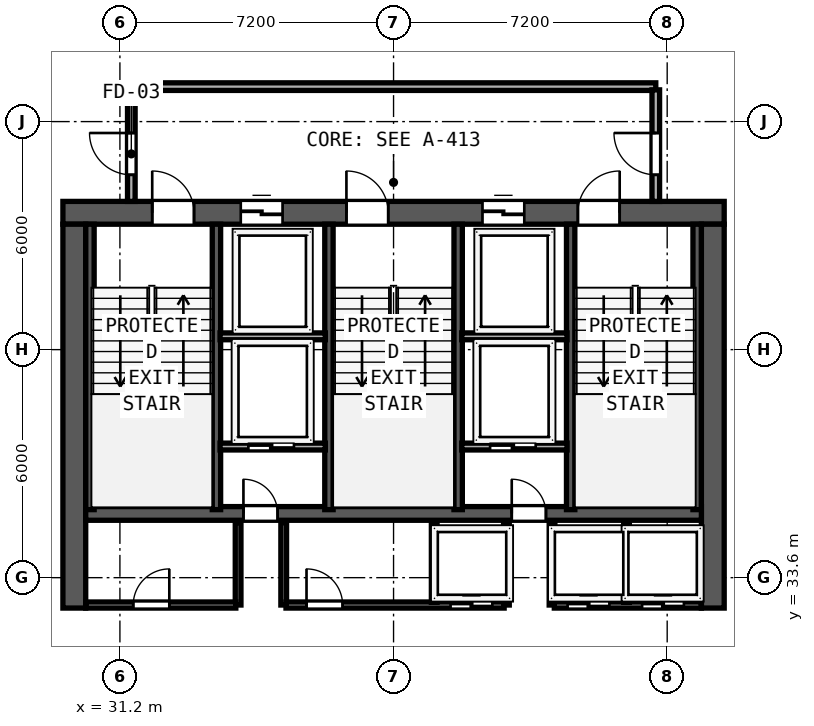
"""IFC4 building model, lengths in metres.
Left out: names, types, materials, properties, quantities, classifications, styles, units other than length and angle.
Written with IfcOpenShell. Run it as: python <this file> out.ifc"""

import sys

from ifc_helpers import new_model, si_unit, direction, frame, frame_2d, origin, place, context, subcontext, project, spatial, rectangle, extrude, element, fill, save


model = new_model("IFC4")
c1 = context("Model", 3, precision=1e-05, world=origin(), true_north=direction((0.0, 1.0)))
c2 = subcontext(c1, "Body", "Model", "MODEL_VIEW")
j1 = project(units=[si_unit("LENGTHUNIT", "METRE"), si_unit("PLANEANGLEUNIT", "RADIAN")], contexts=[c1])
p1 = place(None, origin())
s1 = spatial("IfcSite", under=j1, at=p1, CompositionType="ELEMENT")
p2 = place(p1, origin())
s2 = spatial("IfcBuilding", under=s1, at=p2, CompositionType="ELEMENT")
p3 = place(p2, frame((0.0, 0.0, 176.6)))
s3 = spatial("IfcBuildingStorey", under=s2, at=p3, CompositionType="ELEMENT", Elevation=176.6)
p4 = place(p3, frame((29.7, 43.2, 0.0), z_axis=(0.0, 0.0, 1.0), x_axis=(1.0, 0.0, 0.0)))
e1 = element("IfcWall", 1, at=p4, inside=s3, PredefinedType="SHEAR", context=c2, shape_type="SweptSolid", body=[
    extrude(rectangle(XDim=17.4, YDim=0.6, at=frame_2d((8.7, 0.0))), origin(), (0.0, 0.0, 1.0), 3.62),
])
p5 = place(p4, frame((2.35, 0.0, 0.0)))
e2 = element("IfcOpeningElement", 2, at=p5, cuts=e1, PredefinedType="OPENING", context=c2, shape_type="SweptSolid", body=[
    extrude(rectangle(XDim=1.1, YDim=2.15, at=frame_2d((0.55, 1.075))), frame((0.0, 0.31, 0.0), z_axis=(0.0, -1.0, 0.0), x_axis=(1.0, 0.0, 0.0)), (0.0, 0.0, 1.0), 0.62),
])
p6 = place(p4, frame((7.46, 0.0, 0.0)))
e3 = element("IfcOpeningElement", 3, at=p6, cuts=e1, PredefinedType="OPENING", context=c2, shape_type="SweptSolid", body=[
    extrude(rectangle(XDim=1.1, YDim=2.15, at=frame_2d((0.55, 1.075))), frame((0.0, 0.31, 0.0), z_axis=(0.0, -1.0, 0.0), x_axis=(1.0, 0.0, 0.0)), (0.0, 0.0, 1.0), 0.62),
])
p7 = place(p4, frame((13.55, 0.0, 0.0)))
e4 = element("IfcOpeningElement", 4, at=p7, cuts=e1, PredefinedType="OPENING", context=c2, shape_type="SweptSolid", body=[
    extrude(rectangle(XDim=1.1, YDim=2.15, at=frame_2d((0.55, 1.075))), frame((0.0, 0.31, 0.0), z_axis=(0.0, -1.0, 0.0), x_axis=(1.0, 0.0, 0.0)), (0.0, 0.0, 1.0), 0.62),
])
p8 = place(p4, frame((4.68, 0.0, 0.0)))
e5 = element("IfcOpeningElement", 5, at=p8, cuts=e1, PredefinedType="OPENING", context=c2, shape_type="SweptSolid", body=[
    extrude(rectangle(XDim=1.1, YDim=2.2, at=frame_2d((0.55, 1.1))), frame((0.0, 0.31, 0.0), z_axis=(0.0, -1.0, 0.0), x_axis=(1.0, 0.0, 0.0)), (0.0, 0.0, 1.0), 0.62),
])
p9 = place(p4, frame((11.04, 0.0, 0.0)))
e6 = element("IfcOpeningElement", 6, at=p9, cuts=e1, PredefinedType="OPENING", context=c2, shape_type="SweptSolid", body=[
    extrude(rectangle(XDim=1.1, YDim=2.2, at=frame_2d((0.55, 1.1))), frame((0.0, 0.31, 0.0), z_axis=(0.0, -1.0, 0.0), x_axis=(1.0, 0.0, 0.0)), (0.0, 0.0, 1.0), 0.62),
])
for number, where, z_axis, x_axis in (
    (7, (30.0, 32.8, 0.0), (0.0, 0.0, 1.0), (0.0, 1.0, 0.0)),
    (8, (46.8, 32.8, 0.0), (0.0, 0.0, 1.0), (0.0, 1.0, 0.0)),
):
    element("IfcWall", number, at=place(p3, frame(where, z_axis=z_axis, x_axis=x_axis)), inside=s3, PredefinedType="SHEAR", context=c2, shape_type="SweptSolid", body=[
        extrude(rectangle(XDim=10.1, YDim=0.6, at=frame_2d((5.05, 0.0))), origin(), (0.0, 0.0, 1.0), 3.62),
    ])
p10 = place(p3, frame((30.3, 35.29, 0.0), z_axis=(0.0, 0.0, 1.0), x_axis=(1.0, 0.0, 0.0)))
e9 = element("IfcWall", 9, at=p10, inside=s3, PredefinedType="SHEAR", context=c2, shape_type="SweptSolid", body=[
    extrude(rectangle(XDim=16.2, YDim=0.36, at=frame_2d((8.1, 0.0))), origin(), (0.0, 0.0, 1.0), 3.62),
])
p11 = place(p10, frame((5.05, 0.0, 0.0), z_axis=(0.0, 0.0, 1.0), x_axis=(-1.0, 0.0, 0.0)))
e10 = element("IfcOpeningElement", 10, at=p11, cuts=e9, PredefinedType="OPENING", context=c2, shape_type="SweptSolid", body=[
    extrude(rectangle(XDim=0.9, YDim=2.1, at=frame_2d((0.45, 1.05))), frame((0.0, 0.19, 0.0), z_axis=(0.0, -1.0, 0.0), x_axis=(1.0, 0.0, 0.0)), (0.0, 0.0, 1.0), 0.38),
])
p12 = place(p10, frame((12.11, 0.0, 0.0), z_axis=(0.0, 0.0, 1.0), x_axis=(-1.0, 0.0, 0.0)))
e11 = element("IfcOpeningElement", 11, at=p12, cuts=e9, PredefinedType="OPENING", context=c2, shape_type="SweptSolid", body=[
    extrude(rectangle(XDim=0.9, YDim=2.1, at=frame_2d((0.45, 1.05))), frame((0.0, 0.19, 0.0), z_axis=(0.0, -1.0, 0.0), x_axis=(1.0, 0.0, 0.0)), (0.0, 0.0, 1.0), 0.38),
])
for number, where, z_axis, x_axis in (
    (12, (30.412, 35.39, 0.0), (0.0, 0.0, 1.0), (0.0, 1.0, 0.0)),
    (13, (33.74, 35.39, 0.0), (0.0, 0.0, 1.0), (0.0, 1.0, 0.0)),
    (14, (36.7, 35.39, 0.0), (0.0, 0.0, 1.0), (0.0, 1.0, 0.0)),
    (15, (40.1, 35.39, 0.0), (0.0, 0.0, 1.0), (0.0, 1.0, 0.0)),
    (16, (43.06, 35.39, 0.0), (0.0, 0.0, 1.0), (0.0, 1.0, 0.0)),
    (17, (46.388, 35.39, 0.0), (0.0, 0.0, 1.0), (0.0, 1.0, 0.0)),
):
    element("IfcWall", number, at=place(p3, frame(where, z_axis=z_axis, x_axis=x_axis)), inside=s3, PredefinedType="SHEAR", context=c2, shape_type="SweptSolid", body=[
        extrude(rectangle(XDim=7.51, YDim=0.22, at=frame_2d((3.755, 0.0))), origin(), (0.0, 0.0, 1.0), 3.62),
    ])
p13 = place(p3, frame((31.5, 46.52, 0.0), z_axis=(0.0, 0.0, 1.0), x_axis=(1.0, 0.0, 0.0)))
e18 = element("IfcWall", 18, at=p13, inside=s3, PredefinedType="SOLIDWALL", context=c2, shape_type="SweptSolid", body=[
    extrude(rectangle(XDim=13.8, YDim=0.2, at=frame_2d((6.9, 0.0))), origin(), (0.0, 0.0, 1.0), 3.62),
])
p14 = place(p3, frame((31.5, 43.5, 0.0), z_axis=(0.0, 0.0, 1.0), x_axis=(0.0, 1.0, 0.0)))
e19 = element("IfcWall", 19, at=p14, inside=s3, PredefinedType="SOLIDWALL", context=c2, shape_type="SweptSolid", body=[
    extrude(rectangle(XDim=2.935, YDim=0.2, at=frame_2d((1.468, 0.0))), origin(), (0.0, 0.0, 1.0), 3.62),
])
p15 = place(p14, frame((1.8, 0.0, 0.0), z_axis=(0.0, 0.0, 1.0), x_axis=(-1.0, 0.0, 0.0)))
e20 = element("IfcOpeningElement", 20, at=p15, cuts=e19, PredefinedType="OPENING", context=c2, shape_type="SweptSolid", body=[
    extrude(rectangle(XDim=1.1, YDim=2.15, at=frame_2d((0.55, 1.075))), frame((0.0, 0.11, 0.0), z_axis=(0.0, -1.0, 0.0), x_axis=(1.0, 0.0, 0.0)), (0.0, 0.0, 1.0), 0.22),
])
p16 = place(p3, frame((45.3, 43.5, 0.0), z_axis=(0.0, 0.0, 1.0), x_axis=(0.0, 1.0, 0.0)))
e21 = element("IfcWall", 21, at=p16, inside=s3, PredefinedType="SOLIDWALL", context=c2, shape_type="SweptSolid", body=[
    extrude(rectangle(XDim=2.935, YDim=0.2, at=frame_2d((1.468, 0.0))), origin(), (0.0, 0.0, 1.0), 3.62),
])
p17 = place(p16, frame((0.7, 0.0, 0.0)))
e22 = element("IfcOpeningElement", 22, at=p17, cuts=e21, PredefinedType="OPENING", context=c2, shape_type="SweptSolid", body=[
    extrude(rectangle(XDim=1.1, YDim=2.15, at=frame_2d((0.55, 1.075))), frame((0.0, 0.11, 0.0), z_axis=(0.0, -1.0, 0.0), x_axis=(1.0, 0.0, 0.0)), (0.0, 0.0, 1.0), 0.22),
])
for number, where, z_axis, x_axis in (
    (23, (33.835, 39.95, 0.0), (0.0, 0.0, 1.0), (1.0, 0.0, 0.0)),
    (24, (40.195, 39.95, 0.0), (0.0, 0.0, 1.0), (1.0, 0.0, 0.0)),
):
    element("IfcWall", number, at=place(p3, frame(where, z_axis=z_axis, x_axis=x_axis)), inside=s3, PredefinedType="SOLIDWALL", context=c2, shape_type="SweptSolid", body=[
        extrude(rectangle(XDim=2.77, YDim=0.18, at=frame_2d((1.385, 0.0))), origin(), (0.0, 0.0, 1.0), 3.62),
    ])
p18 = place(p3, frame((33.835, 37.05, 0.0), z_axis=(0.0, 0.0, 1.0), x_axis=(1.0, 0.0, 0.0)))
e25 = element("IfcWall", 25, at=p18, inside=s3, PredefinedType="SOLIDWALL", context=c2, shape_type="SweptSolid", body=[
    extrude(rectangle(XDim=2.77, YDim=0.18, at=frame_2d((1.385, 0.0))), origin(), (0.0, 0.0, 1.0), 3.62),
])
p19 = place(p18, frame((1.945, 0.0, 0.0), z_axis=(0.0, 0.0, 1.0), x_axis=(-1.0, 0.0, 0.0)))
e26 = element("IfcOpeningElement", 26, at=p19, cuts=e25, PredefinedType="OPENING", context=c2, shape_type="SweptSolid", body=[
    extrude(rectangle(XDim=1.2, YDim=2.2, at=frame_2d((0.6, 1.1))), frame((0.0, 0.1, 0.0), z_axis=(0.0, -1.0, 0.0), x_axis=(1.0, 0.0, 0.0)), (0.0, 0.0, 1.0), 0.2),
])
for number, where, z_axis, x_axis in (
    (27, (34.31, 32.88, 0.0), (0.0, 0.0, 1.0), (0.0, 1.0, 0.0)),
    (28, (35.51, 32.88, 0.0), (0.0, 0.0, 1.0), (0.0, 1.0, 0.0)),
):
    element("IfcWall", number, at=place(p3, frame(where, z_axis=z_axis, x_axis=x_axis)), inside=s3, PredefinedType="SOLIDWALL", context=c2, shape_type="SweptSolid", body=[
        extrude(rectangle(XDim=2.17, YDim=0.15, at=frame_2d((1.085, 0.0))), origin(), (0.0, 0.0, 1.0), 3.62),
    ])
p20 = place(p3, frame((40.195, 37.05, 0.0), z_axis=(0.0, 0.0, 1.0), x_axis=(1.0, 0.0, 0.0)))
e29 = element("IfcWall", 29, at=p20, inside=s3, PredefinedType="SOLIDWALL", context=c2, shape_type="SweptSolid", body=[
    extrude(rectangle(XDim=2.77, YDim=0.18, at=frame_2d((1.385, 0.0))), origin(), (0.0, 0.0, 1.0), 3.62),
])
p21 = place(p20, frame((1.945, 0.0, 0.0), z_axis=(0.0, 0.0, 1.0), x_axis=(-1.0, 0.0, 0.0)))
e30 = element("IfcOpeningElement", 30, at=p21, cuts=e29, PredefinedType="OPENING", context=c2, shape_type="SweptSolid", body=[
    extrude(rectangle(XDim=1.2, YDim=2.2, at=frame_2d((0.6, 1.1))), frame((0.0, 0.1, 0.0), z_axis=(0.0, -1.0, 0.0), x_axis=(1.0, 0.0, 0.0)), (0.0, 0.0, 1.0), 0.2),
])
for number, where, z_axis, x_axis in (
    (31, (41.37, 32.88, 0.0), (0.0, 0.0, 1.0), (0.0, 1.0, 0.0)),
    (32, (42.57, 32.88, 0.0), (0.0, 0.0, 1.0), (0.0, 1.0, 0.0)),
):
    element("IfcWall", number, at=place(p3, frame(where, z_axis=z_axis, x_axis=x_axis)), inside=s3, PredefinedType="SOLIDWALL", context=c2, shape_type="SweptSolid", body=[
        extrude(rectangle(XDim=2.17, YDim=0.15, at=frame_2d((1.085, 0.0))), origin(), (0.0, 0.0, 1.0), 3.62),
    ])
p22 = place(p3, frame((30.3, 32.88, 0.0), z_axis=(0.0, 0.0, 1.0), x_axis=(1.0, 0.0, 0.0)))
e33 = element("IfcWall", 33, at=p22, inside=s3, PredefinedType="SOLIDWALL", context=c2, shape_type="SweptSolid", body=[
    extrude(rectangle(XDim=3.95, YDim=0.16, at=frame_2d((1.975, 0.0))), origin(), (0.0, 0.0, 1.0), 3.62),
])
p23 = place(p22, frame((2.2, 0.0, 0.0), z_axis=(0.0, 0.0, 1.0), x_axis=(-1.0, 0.0, 0.0)))
e34 = element("IfcOpeningElement", 34, at=p23, cuts=e33, PredefinedType="OPENING", context=c2, shape_type="SweptSolid", body=[
    extrude(rectangle(XDim=0.95, YDim=2.12, at=frame_2d((0.475, 1.06))), frame((0.0, 0.09, 0.0), z_axis=(0.0, -1.0, 0.0), x_axis=(1.0, 0.0, 0.0)), (0.0, 0.0, 1.0), 0.18),
])
p24 = place(p3, frame((35.57, 32.88, 0.0), z_axis=(0.0, 0.0, 1.0), x_axis=(1.0, 0.0, 0.0)))
e35 = element("IfcWall", 35, at=p24, inside=s3, PredefinedType="SOLIDWALL", context=c2, shape_type="SweptSolid", body=[
    extrude(rectangle(XDim=5.74, YDim=0.16, at=frame_2d((2.87, 0.0))), origin(), (0.0, 0.0, 1.0), 3.62),
])
p25 = place(p24, frame((1.49, 0.0, 0.0), z_axis=(0.0, 0.0, 1.0), x_axis=(-1.0, 0.0, 0.0)))
e36 = element("IfcOpeningElement", 36, at=p25, cuts=e35, PredefinedType="OPENING", context=c2, shape_type="SweptSolid", body=[
    extrude(rectangle(XDim=0.95, YDim=2.12, at=frame_2d((0.475, 1.06))), frame((0.0, 0.09, 0.0), z_axis=(0.0, -1.0, 0.0), x_axis=(1.0, 0.0, 0.0)), (0.0, 0.0, 1.0), 0.18),
])
p26 = place(p24, frame((5.43, 0.0, 0.0), z_axis=(0.0, 0.0, 1.0), x_axis=(-1.0, 0.0, 0.0)))
e37 = element("IfcOpeningElement", 37, at=p26, cuts=e35, PredefinedType="OPENING", context=c2, shape_type="SweptSolid", body=[
    extrude(rectangle(XDim=1.1, YDim=2.2, at=frame_2d((0.55, 1.1))), frame((0.0, 0.09, 0.0), z_axis=(0.0, -1.0, 0.0), x_axis=(1.0, 0.0, 0.0)), (0.0, 0.0, 1.0), 0.18),
])
p27 = place(p3, frame((42.63, 32.88, 0.0), z_axis=(0.0, 0.0, 1.0), x_axis=(1.0, 0.0, 0.0)))
e38 = element("IfcWall", 38, at=p27, inside=s3, PredefinedType="SOLIDWALL", context=c2, shape_type="SweptSolid", body=[
    extrude(rectangle(XDim=3.87, YDim=0.16, at=frame_2d((1.935, 0.0))), origin(), (0.0, 0.0, 1.0), 3.62),
])
p28 = place(p27, frame((1.45, 0.0, 0.0), z_axis=(0.0, 0.0, 1.0), x_axis=(-1.0, 0.0, 0.0)))
e39 = element("IfcOpeningElement", 39, at=p28, cuts=e38, PredefinedType="OPENING", context=c2, shape_type="SweptSolid", body=[
    extrude(rectangle(XDim=1.1, YDim=2.2, at=frame_2d((0.55, 1.1))), frame((0.0, 0.09, 0.0), z_axis=(0.0, -1.0, 0.0), x_axis=(1.0, 0.0, 0.0)), (0.0, 0.0, 1.0), 0.18),
])
p29 = place(p27, frame((3.41, 0.0, 0.0), z_axis=(0.0, 0.0, 1.0), x_axis=(-1.0, 0.0, 0.0)))
e40 = element("IfcOpeningElement", 40, at=p29, cuts=e38, PredefinedType="OPENING", context=c2, shape_type="SweptSolid", body=[
    extrude(rectangle(XDim=1.1, YDim=2.2, at=frame_2d((0.55, 1.1))), frame((0.0, 0.09, 0.0), z_axis=(0.0, -1.0, 0.0), x_axis=(1.0, 0.0, 0.0)), (0.0, 0.0, 1.0), 0.18),
])
for number, where, z_axis, x_axis in (
    (41, (39.47, 32.95, 0.0), (0.0, 0.0, 1.0), (0.0, 1.0, 0.0)),
    (42, (44.53, 32.95, 0.0), (0.0, 0.0, 1.0), (0.0, 1.0, 0.0)),
):
    element("IfcWall", number, at=place(p3, frame(where, z_axis=z_axis, x_axis=x_axis)), inside=s3, PredefinedType="SOLIDWALL", context=c2, shape_type="SweptSolid", body=[
        extrude(rectangle(XDim=2.05, YDim=0.15, at=frame_2d((1.025, 0.0))), origin(), (0.0, 0.0, 1.0), 3.62),
    ])
p30 = place(p5, origin())
e43 = element("IfcDoor", 43, at=p30, inside=s3, OperationType="SINGLE_SWING_LEFT", PredefinedType="DOOR", context=c2, shape_type="SweptSolid", body=[
    extrude(rectangle(XDim=1.1, YDim=2.15, at=frame_2d((0.55, 1.075))), frame((0.0, 0.185, 0.0), z_axis=(0.0, -1.0, 0.0), x_axis=(1.0, 0.0, 0.0)), (0.0, 0.0, 1.0), 0.05),
])
fill(e2, e43)
p31 = place(p6, origin())
e44 = element("IfcDoor", 44, at=p31, inside=s3, OperationType="SINGLE_SWING_LEFT", PredefinedType="DOOR", context=c2, shape_type="SweptSolid", body=[
    extrude(rectangle(XDim=1.1, YDim=2.15, at=frame_2d((0.55, 1.075))), frame((0.0, 0.185, 0.0), z_axis=(0.0, -1.0, 0.0), x_axis=(1.0, 0.0, 0.0)), (0.0, 0.0, 1.0), 0.05),
])
fill(e3, e44)
p32 = place(p7, origin())
e45 = element("IfcDoor", 45, at=p32, inside=s3, OperationType="SINGLE_SWING_RIGHT", PredefinedType="DOOR", context=c2, shape_type="SweptSolid", body=[
    extrude(rectangle(XDim=1.1, YDim=2.15, at=frame_2d((0.55, 1.075))), frame((0.0, 0.185, 0.0), z_axis=(0.0, -1.0, 0.0), x_axis=(1.0, 0.0, 0.0)), (0.0, 0.0, 1.0), 0.05),
])
fill(e4, e45)
p33 = place(p15, origin())
e46 = element("IfcDoor", 46, at=p33, inside=s3, OperationType="SINGLE_SWING_LEFT", PredefinedType="DOOR", context=c2, shape_type="SweptSolid", body=[
    extrude(rectangle(XDim=1.1, YDim=2.15, at=frame_2d((0.55, 1.075))), frame((0.0, 0.025, 0.0), z_axis=(0.0, -1.0, 0.0), x_axis=(1.0, 0.0, 0.0)), (0.0, 0.0, 1.0), 0.05),
])
fill(e20, e46)
p34 = place(p17, origin())
e47 = element("IfcDoor", 47, at=p34, inside=s3, OperationType="SINGLE_SWING_RIGHT", PredefinedType="DOOR", context=c2, shape_type="SweptSolid", body=[
    extrude(rectangle(XDim=1.1, YDim=2.15, at=frame_2d((0.55, 1.075))), frame((0.0, 0.025, 0.0), z_axis=(0.0, -1.0, 0.0), x_axis=(1.0, 0.0, 0.0)), (0.0, 0.0, 1.0), 0.05),
])
fill(e22, e47)
p35 = place(p8, origin())
e48 = element("IfcDoor", 48, at=p35, inside=s3, OperationType="SLIDING_TO_LEFT", PredefinedType="DOOR", context=c2, shape_type="SweptSolid", body=[
    extrude(rectangle(XDim=1.1, YDim=2.2, at=frame_2d((0.55, 1.1))), frame((0.0, 0.185, 0.0), z_axis=(0.0, -1.0, 0.0), x_axis=(1.0, 0.0, 0.0)), (0.0, 0.0, 1.0), 0.05),
])
fill(e5, e48)
p36 = place(p9, origin())
e49 = element("IfcDoor", 49, at=p36, inside=s3, OperationType="SLIDING_TO_LEFT", PredefinedType="DOOR", context=c2, shape_type="SweptSolid", body=[
    extrude(rectangle(XDim=1.1, YDim=2.2, at=frame_2d((0.55, 1.1))), frame((0.0, 0.185, 0.0), z_axis=(0.0, -1.0, 0.0), x_axis=(1.0, 0.0, 0.0)), (0.0, 0.0, 1.0), 0.05),
])
fill(e6, e49)
p37 = place(p19, origin())
e50 = element("IfcDoor", 50, at=p37, inside=s3, OperationType="SLIDING_TO_RIGHT", PredefinedType="DOOR", context=c2, shape_type="SweptSolid", body=[
    extrude(rectangle(XDim=1.2, YDim=2.2, at=frame_2d((0.6, 1.1))), frame((0.0, 0.025, 0.0), z_axis=(0.0, -1.0, 0.0), x_axis=(1.0, 0.0, 0.0)), (0.0, 0.0, 1.0), 0.05),
])
fill(e26, e50)
p38 = place(p11, origin())
e51 = element("IfcDoor", 51, at=p38, inside=s3, OperationType="SINGLE_SWING_RIGHT", PredefinedType="DOOR", context=c2, shape_type="SweptSolid", body=[
    extrude(rectangle(XDim=0.9, YDim=2.1, at=frame_2d((0.45, 1.05))), frame((0.0, 0.025, 0.0), z_axis=(0.0, -1.0, 0.0), x_axis=(1.0, 0.0, 0.0)), (0.0, 0.0, 1.0), 0.05),
])
fill(e10, e51)
p39 = place(p21, origin())
e52 = element("IfcDoor", 52, at=p39, inside=s3, OperationType="SLIDING_TO_RIGHT", PredefinedType="DOOR", context=c2, shape_type="SweptSolid", body=[
    extrude(rectangle(XDim=1.2, YDim=2.2, at=frame_2d((0.6, 1.1))), frame((0.0, 0.025, 0.0), z_axis=(0.0, -1.0, 0.0), x_axis=(1.0, 0.0, 0.0)), (0.0, 0.0, 1.0), 0.05),
])
fill(e30, e52)
p40 = place(p12, origin())
e53 = element("IfcDoor", 53, at=p40, inside=s3, OperationType="SINGLE_SWING_RIGHT", PredefinedType="DOOR", context=c2, shape_type="SweptSolid", body=[
    extrude(rectangle(XDim=0.9, YDim=2.1, at=frame_2d((0.45, 1.05))), frame((0.0, 0.025, 0.0), z_axis=(0.0, -1.0, 0.0), x_axis=(1.0, 0.0, 0.0)), (0.0, 0.0, 1.0), 0.05),
])
fill(e11, e53)
p41 = place(p23, origin())
e54 = element("IfcDoor", 54, at=p41, inside=s3, OperationType="SINGLE_SWING_LEFT", PredefinedType="DOOR", context=c2, shape_type="SweptSolid", body=[
    extrude(rectangle(XDim=0.95, YDim=2.12, at=frame_2d((0.475, 1.06))), frame((0.0, 0.025, 0.0), z_axis=(0.0, -1.0, 0.0), x_axis=(1.0, 0.0, 0.0)), (0.0, 0.0, 1.0), 0.05),
])
fill(e34, e54)
p42 = place(p25, origin())
e55 = element("IfcDoor", 55, at=p42, inside=s3, OperationType="SINGLE_SWING_RIGHT", PredefinedType="DOOR", context=c2, shape_type="SweptSolid", body=[
    extrude(rectangle(XDim=0.95, YDim=2.12, at=frame_2d((0.475, 1.06))), frame((0.0, 0.025, 0.0), z_axis=(0.0, -1.0, 0.0), x_axis=(1.0, 0.0, 0.0)), (0.0, 0.0, 1.0), 0.05),
])
fill(e36, e55)
p43 = place(p26, origin())
e56 = element("IfcDoor", 56, at=p43, inside=s3, OperationType="SLIDING_TO_RIGHT", PredefinedType="DOOR", context=c2, shape_type="SweptSolid", body=[
    extrude(rectangle(XDim=1.1, YDim=2.2, at=frame_2d((0.55, 1.1))), frame((0.0, 0.025, 0.0), z_axis=(0.0, -1.0, 0.0), x_axis=(1.0, 0.0, 0.0)), (0.0, 0.0, 1.0), 0.05),
])
fill(e37, e56)
p44 = place(p28, origin())
e57 = element("IfcDoor", 57, at=p44, inside=s3, OperationType="SLIDING_TO_RIGHT", PredefinedType="DOOR", context=c2, shape_type="SweptSolid", body=[
    extrude(rectangle(XDim=1.1, YDim=2.2, at=frame_2d((0.55, 1.1))), frame((0.0, 0.025, 0.0), z_axis=(0.0, -1.0, 0.0), x_axis=(1.0, 0.0, 0.0)), (0.0, 0.0, 1.0), 0.05),
])
fill(e39, e57)
p45 = place(p29, origin())
e58 = element("IfcDoor", 58, at=p45, inside=s3, OperationType="SLIDING_TO_RIGHT", PredefinedType="DOOR", context=c2, shape_type="SweptSolid", body=[
    extrude(rectangle(XDim=1.1, YDim=2.2, at=frame_2d((0.55, 1.1))), frame((0.0, 0.025, 0.0), z_axis=(0.0, -1.0, 0.0), x_axis=(1.0, 0.0, 0.0)), (0.0, 0.0, 1.0), 0.05),
])
fill(e40, e58)
save(model, sys.argv[1])
